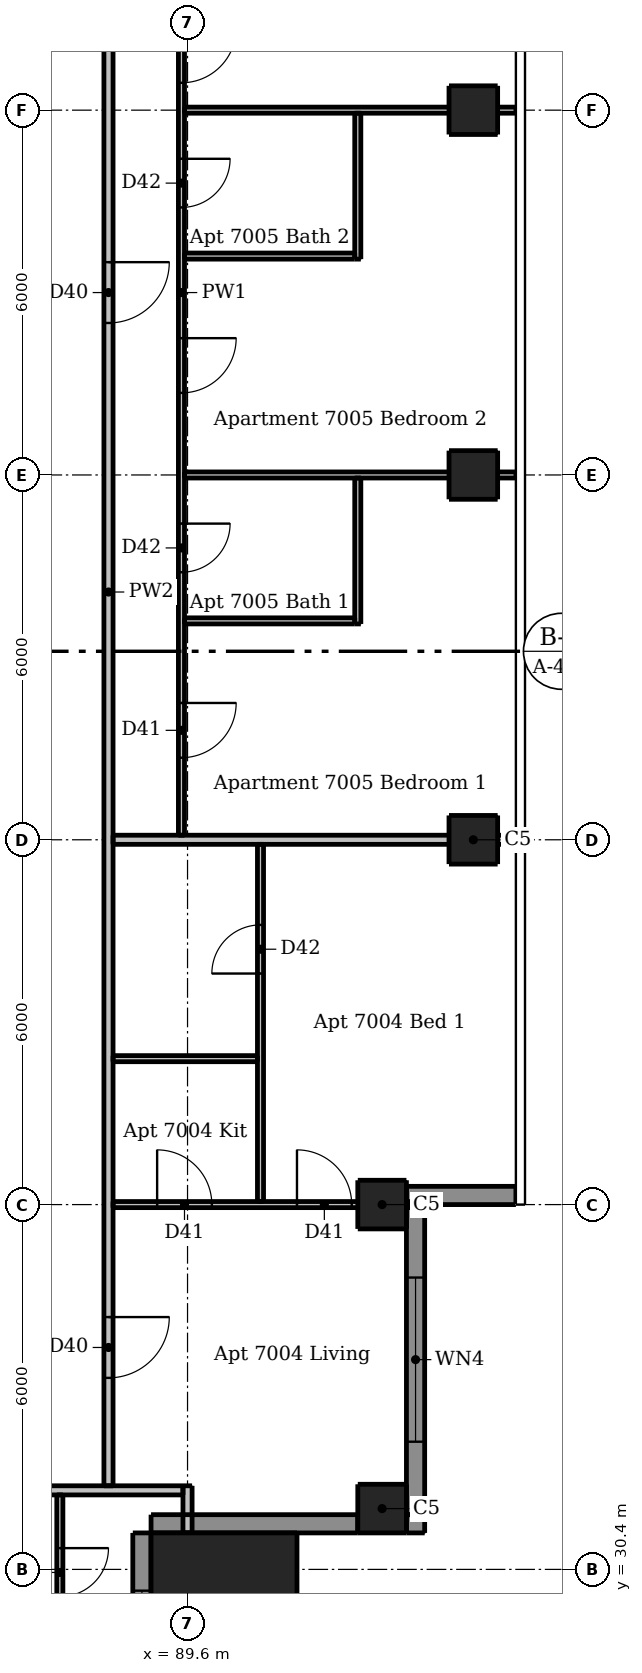
"""IFC4 building model, lengths in metres.
Left out: names, types, materials, properties, quantities, classifications, styles, units other than length and angle.
Written with IfcOpenShell. Run it as: python <this file> out.ifc"""

import sys

from ifc_helpers import new_model, si_unit, direction, frame, frame_2d, origin, origin_2d, place, context, subcontext, project, spatial, rectangle, extrude, element, fill, save


model = new_model("IFC4")
c1 = context("Model", 3, precision=1e-05, world=origin(), true_north=direction((0.0, 1.0)))
c2 = subcontext(c1, "Body", "Model", "MODEL_VIEW")
j1 = project(units=[si_unit("LENGTHUNIT", "METRE"), si_unit("PLANEANGLEUNIT", "RADIAN")], contexts=[c1])
p1 = place(None, origin())
s1 = spatial("IfcSite", under=j1, at=p1, CompositionType="ELEMENT")
p2 = place(p1, origin())
s2 = spatial("IfcBuilding", under=s1, at=p2, CompositionType="ELEMENT")
p3 = place(p2, frame((0.0, 0.0, 262.0)))
s3 = spatial("IfcBuildingStorey", under=s2, at=p3, CompositionType="ELEMENT", Elevation=262.0)
for number, where, z_axis, x_axis in (
    (1, (92.8, 31.4, 0.0), (0.0, 0.0, 1.0), (1.0, 0.0, 0.0)),
    (2, (92.8, 36.4, 0.0), (0.0, 0.0, 1.0), (1.0, 0.0, 0.0)),
    (3, (94.3, 42.4, 0.0), (0.0, 0.0, 1.0), (1.0, 0.0, 0.0)),
    (4, (94.3, 48.4, 0.0), (0.0, 0.0, 1.0), (1.0, 0.0, 0.0)),
    (5, (94.3, 54.4, 0.0), (0.0, 0.0, 1.0), (1.0, 0.0, 0.0)),
):
    element("IfcColumn", number, at=place(p3, frame(where, z_axis=z_axis, x_axis=x_axis)), inside=s3, PredefinedType="COLUMN", context=c2, shape_type="SweptSolid", body=[
        extrude(rectangle(XDim=0.8, YDim=0.8, at=origin_2d()), origin(), (0.0, 0.0, 1.0), 3.05),
    ])
p4 = place(p3, frame((90.2, 29.8, 0.0), z_axis=(0.0, 0.0, 1.0), x_axis=(1.0, 0.0, 0.0)))
e6 = element("IfcColumn", 6, at=p4, inside=s3, PredefinedType="COLUMN", context=c2, shape_type="SweptSolid", body=[
    extrude(rectangle(XDim=2.4, YDim=2.4, at=origin_2d()), origin(), (0.0, 0.0, 1.0), 3.3),
])
p5 = place(p3, frame((88.85, 27.6, 0.0), z_axis=(0.0, 0.0, 1.0), x_axis=(0.0, 1.0, 0.0)))
e7 = element("IfcWall", 7, at=p5, inside=s3, PredefinedType="SOLIDWALL", context=c2, shape_type="SweptSolid", body=[
    extrude(rectangle(XDim=3.4, YDim=0.3, at=frame_2d((1.7, 0.0))), origin(), (0.0, 0.0, 1.0), 3.05),
])
p6 = place(p5, frame((0.95, 0.0, 0.9)))
e8 = element("IfcOpeningElement", 8, at=p6, cuts=e7, PredefinedType="OPENING", context=c2, shape_type="SweptSolid", body=[
    extrude(rectangle(XDim=1.5, YDim=1.5, at=frame_2d((0.75, 0.75))), frame((0.0, 0.16, 0.0), z_axis=(0.0, -1.0, 0.0), x_axis=(1.0, 0.0, 0.0)), (0.0, 0.0, 1.0), 0.32),
])
p7 = place(p3, frame((89.0, 31.15, 0.0), z_axis=(0.0, 0.0, 1.0), x_axis=(1.0, 0.0, 0.0)))
e9 = element("IfcWall", 9, at=p7, inside=s3, PredefinedType="SOLIDWALL", context=c2, shape_type="SweptSolid", body=[
    extrude(rectangle(XDim=3.4, YDim=0.3, at=frame_2d((1.7, 0.0))), origin(), (0.0, 0.0, 1.0), 3.05),
])
p8 = place(p3, frame((93.2, 31.15, 0.0), z_axis=(0.0, 0.0, 1.0), x_axis=(1.0, 0.0, 0.0)))
e10 = element("IfcWall", 10, at=p8, inside=s3, PredefinedType="SOLIDWALL", context=c2, shape_type="SweptSolid", body=[
    extrude(rectangle(XDim=0.3, YDim=0.3, at=frame_2d((0.15, 0.0))), origin(), (0.0, 0.0, 1.0), 3.05),
])
p9 = place(p3, frame((93.2, 36.55, 0.0), z_axis=(0.0, 0.0, 1.0), x_axis=(1.0, 0.0, 0.0)))
e11 = element("IfcWall", 11, at=p9, inside=s3, PredefinedType="SOLIDWALL", context=c2, shape_type="SweptSolid", body=[
    extrude(rectangle(XDim=1.8, YDim=0.3, at=frame_2d((0.9, 0.0))), origin(), (0.0, 0.0, 1.0), 3.05),
])
p10 = place(p3, frame((93.35, 31.3, 0.0), z_axis=(0.0, 0.0, 1.0), x_axis=(0.0, 1.0, 0.0)))
e12 = element("IfcWall", 12, at=p10, inside=s3, PredefinedType="SOLIDWALL", context=c2, shape_type="SweptSolid", body=[
    extrude(rectangle(XDim=5.1, YDim=0.3, at=frame_2d((2.55, 0.0))), origin(), (0.0, 0.0, 1.0), 3.05),
])
p11 = place(p10, frame((1.2, 0.0, 0.15)))
e13 = element("IfcOpeningElement", 13, at=p11, cuts=e12, PredefinedType="OPENING", context=c2, shape_type="SweptSolid", body=[
    extrude(rectangle(XDim=2.7, YDim=2.1, at=frame_2d((1.35, 1.05))), frame((0.0, 0.16, 0.0), z_axis=(0.0, -1.0, 0.0), x_axis=(1.0, 0.0, 0.0)), (0.0, 0.0, 1.0), 0.32),
])
p12 = place(p3, frame((87.5, 31.625, 0.0), z_axis=(0.0, 0.0, 1.0), x_axis=(0.0, -1.0, 0.0)))
e14 = element("IfcWall", 14, at=p12, inside=s3, PredefinedType="PARTITIONING", context=c2, shape_type="SweptSolid", body=[
    extrude(rectangle(XDim=2.675, YDim=0.1, at=frame_2d((1.337, 0.0))), origin(), (0.0, 0.0, 1.0), 3.05),
])
p13 = place(p12, frame((0.875, 0.0, 0.0)))
e15 = element("IfcOpeningElement", 15, at=p13, cuts=e14, PredefinedType="OPENING", context=c2, shape_type="SweptSolid", body=[
    extrude(rectangle(XDim=0.8, YDim=2.1, at=frame_2d((0.4, 1.05))), frame((0.0, 0.06, 0.0), z_axis=(0.0, -1.0, 0.0), x_axis=(1.0, 0.0, 0.0)), (0.0, 0.0, 1.0), 0.12),
])
p14 = place(p3, frame((89.5, 60.325, 0.0), z_axis=(0.0, 0.0, 1.0), x_axis=(0.0, -1.0, 0.0)))
e16 = element("IfcWall", 16, at=p14, inside=s3, PredefinedType="PARTITIONING", context=c2, shape_type="SweptSolid", body=[
    extrude(rectangle(XDim=17.85, YDim=0.1, at=frame_2d((8.925, 0.0))), origin(), (0.0, 0.0, 1.0), 3.05),
])
p15 = place(p14, frame((4.575, 0.0, 0.0)))
e17 = element("IfcOpeningElement", 17, at=p15, cuts=e16, PredefinedType="OPENING", context=c2, shape_type="SweptSolid", body=[
    extrude(rectangle(XDim=0.9, YDim=2.1, at=frame_2d((0.45, 1.05))), frame((0.0, 0.06, 0.0), z_axis=(0.0, -1.0, 0.0), x_axis=(1.0, 0.0, 0.0)), (0.0, 0.0, 1.0), 0.12),
])
p16 = place(p14, frame((0.675, 0.0, 0.0)))
e18 = element("IfcOpeningElement", 18, at=p16, cuts=e16, PredefinedType="OPENING", context=c2, shape_type="SweptSolid", body=[
    extrude(rectangle(XDim=0.9, YDim=2.1, at=frame_2d((0.45, 1.05))), frame((0.0, 0.06, 0.0), z_axis=(0.0, -1.0, 0.0), x_axis=(1.0, 0.0, 0.0)), (0.0, 0.0, 1.0), 0.12),
])
p17 = place(p14, frame((2.775, 0.0, 0.0)))
e19 = element("IfcOpeningElement", 19, at=p17, cuts=e16, PredefinedType="OPENING", context=c2, shape_type="SweptSolid", body=[
    extrude(rectangle(XDim=0.9, YDim=2.1, at=frame_2d((0.45, 1.05))), frame((0.0, 0.06, 0.0), z_axis=(0.0, -1.0, 0.0), x_axis=(1.0, 0.0, 0.0)), (0.0, 0.0, 1.0), 0.12),
])
p18 = place(p14, frame((15.675, 0.0, 0.0)))
e20 = element("IfcOpeningElement", 20, at=p18, cuts=e16, PredefinedType="OPENING", context=c2, shape_type="SweptSolid", body=[
    extrude(rectangle(XDim=0.9, YDim=2.1, at=frame_2d((0.45, 1.05))), frame((0.0, 0.06, 0.0), z_axis=(0.0, -1.0, 0.0), x_axis=(1.0, 0.0, 0.0)), (0.0, 0.0, 1.0), 0.12),
])
p19 = place(p14, frame((9.675, 0.0, 0.0)))
e21 = element("IfcOpeningElement", 21, at=p19, cuts=e16, PredefinedType="OPENING", context=c2, shape_type="SweptSolid", body=[
    extrude(rectangle(XDim=0.9, YDim=2.1, at=frame_2d((0.45, 1.05))), frame((0.0, 0.06, 0.0), z_axis=(0.0, -1.0, 0.0), x_axis=(1.0, 0.0, 0.0)), (0.0, 0.0, 1.0), 0.12),
])
p20 = place(p14, frame((12.725, 0.0, 0.0)))
e22 = element("IfcOpeningElement", 22, at=p20, cuts=e16, PredefinedType="OPENING", context=c2, shape_type="SweptSolid", body=[
    extrude(rectangle(XDim=0.8, YDim=2.1, at=frame_2d((0.4, 1.05))), frame((0.0, 0.06, 0.0), z_axis=(0.0, -1.0, 0.0), x_axis=(1.0, 0.0, 0.0)), (0.0, 0.0, 1.0), 0.12),
])
p21 = place(p14, frame((6.725, 0.0, 0.0)))
e23 = element("IfcOpeningElement", 23, at=p21, cuts=e16, PredefinedType="OPENING", context=c2, shape_type="SweptSolid", body=[
    extrude(rectangle(XDim=0.8, YDim=2.1, at=frame_2d((0.4, 1.05))), frame((0.0, 0.06, 0.0), z_axis=(0.0, -1.0, 0.0), x_axis=(1.0, 0.0, 0.0)), (0.0, 0.0, 1.0), 0.12),
])
p22 = place(p3, frame((90.8, 36.45, 0.0), z_axis=(0.0, 0.0, 1.0), x_axis=(0.0, 1.0, 0.0)))
e24 = element("IfcWall", 24, at=p22, inside=s3, PredefinedType="PARTITIONING", context=c2, shape_type="SweptSolid", body=[
    extrude(rectangle(XDim=5.875, YDim=0.1, at=frame_2d((2.938, 0.0))), origin(), (0.0, 0.0, 1.0), 3.05),
])
p23 = place(p22, frame((3.75, 0.0, 0.0)))
e25 = element("IfcOpeningElement", 25, at=p23, cuts=e24, PredefinedType="OPENING", context=c2, shape_type="SweptSolid", body=[
    extrude(rectangle(XDim=0.8, YDim=2.1, at=frame_2d((0.4, 1.05))), frame((0.0, 0.06, 0.0), z_axis=(0.0, -1.0, 0.0), x_axis=(1.0, 0.0, 0.0)), (0.0, 0.0, 1.0), 0.12),
])
for number, where, z_axis, x_axis in (
    (26, (92.4, 45.95, 0.0), (0.0, 0.0, 1.0), (0.0, 1.0, 0.0)),
    (27, (92.4, 51.95, 0.0), (0.0, 0.0, 1.0), (0.0, 1.0, 0.0)),
):
    element("IfcWall", number, at=place(p3, frame(where, z_axis=z_axis, x_axis=x_axis)), inside=s3, PredefinedType="PARTITIONING", context=c2, shape_type="SweptSolid", body=[
        extrude(rectangle(XDim=2.4, YDim=0.1, at=frame_2d((1.2, 0.0))), origin(), (0.0, 0.0, 1.0), 3.05),
    ])
p24 = place(p3, frame((89.55, 54.4, 0.0), z_axis=(0.0, 0.0, 1.0), x_axis=(1.0, 0.0, 0.0)))
e28 = element("IfcWall", 28, at=p24, inside=s3, PredefinedType="PARTITIONING", context=c2, shape_type="SweptSolid", body=[
    extrude(rectangle(XDim=5.45, YDim=0.1, at=frame_2d((2.725, 0.0))), origin(), (0.0, 0.0, 1.0), 2.59),
])
p25 = place(p3, frame((89.55, 52.0, 0.0), z_axis=(0.0, 0.0, 1.0), x_axis=(1.0, 0.0, 0.0)))
e29 = element("IfcWall", 29, at=p25, inside=s3, PredefinedType="PARTITIONING", context=c2, shape_type="SweptSolid", body=[
    extrude(rectangle(XDim=2.8, YDim=0.1, at=frame_2d((1.4, 0.0))), origin(), (0.0, 0.0, 1.0), 3.05),
])
p26 = place(p3, frame((89.55, 48.4, 0.0), z_axis=(0.0, 0.0, 1.0), x_axis=(1.0, 0.0, 0.0)))
e30 = element("IfcWall", 30, at=p26, inside=s3, PredefinedType="PARTITIONING", context=c2, shape_type="SweptSolid", body=[
    extrude(rectangle(XDim=5.45, YDim=0.1, at=frame_2d((2.725, 0.0))), origin(), (0.0, 0.0, 1.0), 2.59),
])
p27 = place(p3, frame((89.55, 46.0, 0.0), z_axis=(0.0, 0.0, 1.0), x_axis=(1.0, 0.0, 0.0)))
e31 = element("IfcWall", 31, at=p27, inside=s3, PredefinedType="PARTITIONING", context=c2, shape_type="SweptSolid", body=[
    extrude(rectangle(XDim=2.8, YDim=0.1, at=frame_2d((1.4, 0.0))), origin(), (0.0, 0.0, 1.0), 3.05),
])
p28 = place(p3, frame((88.375, 38.8, 0.0), z_axis=(0.0, 0.0, 1.0), x_axis=(1.0, 0.0, 0.0)))
e32 = element("IfcWall", 32, at=p28, inside=s3, PredefinedType="PARTITIONING", context=c2, shape_type="SweptSolid", body=[
    extrude(rectangle(XDim=2.375, YDim=0.1, at=frame_2d((1.188, 0.0))), origin(), (0.0, 0.0, 1.0), 3.05),
])
p29 = place(p3, frame((88.375, 36.4, 0.0), z_axis=(0.0, 0.0, 1.0), x_axis=(1.0, 0.0, 0.0)))
e33 = element("IfcWall", 33, at=p29, inside=s3, PredefinedType="PARTITIONING", context=c2, shape_type="SweptSolid", body=[
    extrude(rectangle(XDim=5.125, YDim=0.1, at=frame_2d((2.562, 0.0))), origin(), (0.0, 0.0, 1.0), 2.647),
])
p30 = place(p29, frame((0.725, 0.0, 0.0)))
e34 = element("IfcOpeningElement", 34, at=p30, cuts=e33, PredefinedType="OPENING", context=c2, shape_type="SweptSolid", body=[
    extrude(rectangle(XDim=0.9, YDim=2.1, at=frame_2d((0.45, 1.05))), frame((0.0, 0.06, 0.0), z_axis=(0.0, -1.0, 0.0), x_axis=(1.0, 0.0, 0.0)), (0.0, 0.0, 1.0), 0.12),
])
p31 = place(p29, frame((3.025, 0.0, 0.0)))
e35 = element("IfcOpeningElement", 35, at=p31, cuts=e33, PredefinedType="OPENING", context=c2, shape_type="SweptSolid", body=[
    extrude(rectangle(XDim=0.9, YDim=2.1, at=frame_2d((0.45, 1.05))), frame((0.0, 0.06, 0.0), z_axis=(0.0, -1.0, 0.0), x_axis=(1.0, 0.0, 0.0)), (0.0, 0.0, 1.0), 0.12),
])
p32 = place(p3, frame((88.3, 61.175, 0.0), z_axis=(0.0, 0.0, 1.0), x_axis=(0.0, -1.0, 0.0)))
e36 = element("IfcWall", 36, at=p32, inside=s3, PredefinedType="PARTITIONING", context=c2, shape_type="SweptSolid", body=[
    extrude(rectangle(XDim=29.4, YDim=0.15, at=frame_2d((14.7, 0.0))), origin(), (0.0, 0.0, 1.0), 3.05),
])
p33 = place(p32, frame((26.625, 0.0, 0.0)))
e37 = element("IfcOpeningElement", 37, at=p33, cuts=e36, PredefinedType="OPENING", context=c2, shape_type="SweptSolid", body=[
    extrude(rectangle(XDim=1.0, YDim=2.1, at=frame_2d((0.5, 1.05))), frame((0.0, 0.085, 0.0), z_axis=(0.0, -1.0, 0.0), x_axis=(1.0, 0.0, 0.0)), (0.0, 0.0, 1.0), 0.17),
])
p34 = place(p32, frame((9.275, 0.0, 0.0)))
e38 = element("IfcOpeningElement", 38, at=p34, cuts=e36, PredefinedType="OPENING", context=c2, shape_type="SweptSolid", body=[
    extrude(rectangle(XDim=1.0, YDim=2.1, at=frame_2d((0.5, 1.05))), frame((0.0, 0.085, 0.0), z_axis=(0.0, -1.0, 0.0), x_axis=(1.0, 0.0, 0.0)), (0.0, 0.0, 1.0), 0.17),
])
p35 = place(p3, frame((89.6, 31.0, 0.0), z_axis=(0.0, 0.0, 1.0), x_axis=(0.0, 1.0, 0.0)))
e39 = element("IfcWall", 39, at=p35, inside=s3, PredefinedType="PARTITIONING", context=c2, shape_type="SweptSolid", body=[
    extrude(rectangle(XDim=0.775, YDim=0.15, at=frame_2d((0.387, 0.0))), origin(), (0.0, 0.0, 1.0), 3.05),
])
p36 = place(p3, frame((88.375, 42.4, 0.0), z_axis=(0.0, 0.0, 1.0), x_axis=(1.0, 0.0, 0.0)))
e40 = element("IfcWall", 40, at=p36, inside=s3, PredefinedType="PARTITIONING", context=c2, shape_type="SweptSolid", body=[
    extrude(rectangle(XDim=6.625, YDim=0.15, at=frame_2d((3.312, 0.0))), origin(), (0.0, 0.0, 1.0), 2.59),
])
p37 = place(p3, frame((89.525, 31.7, 0.0), z_axis=(0.0, 0.0, 1.0), x_axis=(-1.0, 0.0, 0.0)))
e41 = element("IfcWall", 41, at=p37, inside=s3, PredefinedType="PARTITIONING", context=c2, shape_type="SweptSolid", body=[
    extrude(rectangle(XDim=30.55, YDim=0.15, at=frame_2d((15.275, 0.0))), origin(), (0.0, 0.0, 1.0), 3.05),
])
p38 = place(p37, frame((26.775, 0.0, 0.0)))
e42 = element("IfcOpeningElement", 42, at=p38, cuts=e41, PredefinedType="OPENING", context=c2, shape_type="SweptSolid", body=[
    extrude(rectangle(XDim=1.0, YDim=2.1, at=frame_2d((0.5, 1.05))), frame((0.0, 0.085, 0.0), z_axis=(0.0, -1.0, 0.0), x_axis=(1.0, 0.0, 0.0)), (0.0, 0.0, 1.0), 0.17),
])
p39 = place(p37, frame((9.625, 0.0, 0.0)))
e43 = element("IfcOpeningElement", 43, at=p39, cuts=e41, PredefinedType="OPENING", context=c2, shape_type="SweptSolid", body=[
    extrude(rectangle(XDim=1.0, YDim=2.1, at=frame_2d((0.5, 1.05))), frame((0.0, 0.085, 0.0), z_axis=(0.0, -1.0, 0.0), x_axis=(1.0, 0.0, 0.0)), (0.0, 0.0, 1.0), 0.17),
])
p40 = place(p37, frame((2.425, 0.0, 0.0)))
e44 = element("IfcOpeningElement", 44, at=p40, cuts=e41, PredefinedType="OPENING", context=c2, shape_type="SweptSolid", body=[
    extrude(rectangle(XDim=1.0, YDim=2.1, at=frame_2d((0.5, 1.05))), frame((0.0, 0.085, 0.0), z_axis=(0.0, -1.0, 0.0), x_axis=(1.0, 0.0, 0.0)), (0.0, 0.0, 1.0), 0.17),
])
p41 = place(p6, origin())
e45 = element("IfcWindow", 45, at=p41, inside=s3, PartitioningType="DOUBLE_PANEL_VERTICAL", PredefinedType="WINDOW", context=c2, shape_type="SweptSolid", body=[
    extrude(rectangle(XDim=1.5, YDim=1.5, at=frame_2d((0.75, 0.75))), frame((0.0, 0.03, 0.0), z_axis=(0.0, -1.0, 0.0), x_axis=(1.0, 0.0, 0.0)), (0.0, 0.0, 1.0), 0.06),
])
fill(e8, e45)
p42 = place(p11, origin())
e46 = element("IfcWindow", 46, at=p42, inside=s3, PartitioningType="DOUBLE_PANEL_VERTICAL", PredefinedType="WINDOW", context=c2, shape_type="SweptSolid", body=[
    extrude(rectangle(XDim=2.7, YDim=2.1, at=frame_2d((1.35, 1.05))), frame((0.0, 0.03, 0.0), z_axis=(0.0, -1.0, 0.0), x_axis=(1.0, 0.0, 0.0)), (0.0, 0.0, 1.0), 0.06),
])
fill(e13, e46)
p43 = place(p13, origin())
e47 = element("IfcDoor", 47, at=p43, inside=s3, OperationType="SINGLE_SWING_LEFT", PredefinedType="DOOR", context=c2, shape_type="SweptSolid", body=[
    extrude(rectangle(XDim=0.8, YDim=2.1, at=frame_2d((0.4, 1.05))), frame((0.0, 0.025, 0.0), z_axis=(0.0, -1.0, 0.0), x_axis=(1.0, 0.0, 0.0)), (0.0, 0.0, 1.0), 0.05),
])
fill(e15, e47)
p44 = place(p33, origin())
e48 = element("IfcDoor", 48, at=p44, inside=s3, OperationType="SINGLE_SWING_LEFT", PredefinedType="DOOR", context=c2, shape_type="SweptSolid", body=[
    extrude(rectangle(XDim=1.0, YDim=2.1, at=frame_2d((0.5, 1.05))), frame((0.0, 0.025, 0.0), z_axis=(0.0, -1.0, 0.0), x_axis=(1.0, 0.0, 0.0)), (0.0, 0.0, 1.0), 0.05),
])
fill(e37, e48)
p45 = place(p30, origin())
e49 = element("IfcDoor", 49, at=p45, inside=s3, OperationType="SINGLE_SWING_LEFT", PredefinedType="DOOR", context=c2, shape_type="SweptSolid", body=[
    extrude(rectangle(XDim=0.9, YDim=2.1, at=frame_2d((0.45, 1.05))), frame((0.0, 0.025, 0.0), z_axis=(0.0, -1.0, 0.0), x_axis=(1.0, 0.0, 0.0)), (0.0, 0.0, 1.0), 0.05),
])
fill(e34, e49)
p46 = place(p31, origin())
e50 = element("IfcDoor", 50, at=p46, inside=s3, OperationType="SINGLE_SWING_LEFT", PredefinedType="DOOR", context=c2, shape_type="SweptSolid", body=[
    extrude(rectangle(XDim=0.9, YDim=2.1, at=frame_2d((0.45, 1.05))), frame((0.0, 0.025, 0.0), z_axis=(0.0, -1.0, 0.0), x_axis=(1.0, 0.0, 0.0)), (0.0, 0.0, 1.0), 0.05),
])
fill(e35, e50)
p47 = place(p23, origin())
e51 = element("IfcDoor", 51, at=p47, inside=s3, OperationType="SINGLE_SWING_LEFT", PredefinedType="DOOR", context=c2, shape_type="SweptSolid", body=[
    extrude(rectangle(XDim=0.8, YDim=2.1, at=frame_2d((0.4, 1.05))), frame((0.0, 0.025, 0.0), z_axis=(0.0, -1.0, 0.0), x_axis=(1.0, 0.0, 0.0)), (0.0, 0.0, 1.0), 0.05),
])
fill(e25, e51)
p48 = place(p34, origin())
e52 = element("IfcDoor", 52, at=p48, inside=s3, OperationType="SINGLE_SWING_LEFT", PredefinedType="DOOR", context=c2, shape_type="SweptSolid", body=[
    extrude(rectangle(XDim=1.0, YDim=2.1, at=frame_2d((0.5, 1.05))), frame((0.0, 0.025, 0.0), z_axis=(0.0, -1.0, 0.0), x_axis=(1.0, 0.0, 0.0)), (0.0, 0.0, 1.0), 0.05),
])
fill(e38, e52)
p49 = place(p15, origin())
e53 = element("IfcDoor", 53, at=p49, inside=s3, OperationType="SINGLE_SWING_LEFT", PredefinedType="DOOR", context=c2, shape_type="SweptSolid", body=[
    extrude(rectangle(XDim=0.9, YDim=2.1, at=frame_2d((0.45, 1.05))), frame((0.0, 0.025, 0.0), z_axis=(0.0, -1.0, 0.0), x_axis=(1.0, 0.0, 0.0)), (0.0, 0.0, 1.0), 0.05),
])
fill(e17, e53)
p50 = place(p18, origin())
e54 = element("IfcDoor", 54, at=p50, inside=s3, OperationType="SINGLE_SWING_LEFT", PredefinedType="DOOR", context=c2, shape_type="SweptSolid", body=[
    extrude(rectangle(XDim=0.9, YDim=2.1, at=frame_2d((0.45, 1.05))), frame((0.0, 0.025, 0.0), z_axis=(0.0, -1.0, 0.0), x_axis=(1.0, 0.0, 0.0)), (0.0, 0.0, 1.0), 0.05),
])
fill(e20, e54)
p51 = place(p19, origin())
e55 = element("IfcDoor", 55, at=p51, inside=s3, OperationType="SINGLE_SWING_LEFT", PredefinedType="DOOR", context=c2, shape_type="SweptSolid", body=[
    extrude(rectangle(XDim=0.9, YDim=2.1, at=frame_2d((0.45, 1.05))), frame((0.0, 0.025, 0.0), z_axis=(0.0, -1.0, 0.0), x_axis=(1.0, 0.0, 0.0)), (0.0, 0.0, 1.0), 0.05),
])
fill(e21, e55)
p52 = place(p20, origin())
e56 = element("IfcDoor", 56, at=p52, inside=s3, OperationType="SINGLE_SWING_LEFT", PredefinedType="DOOR", context=c2, shape_type="SweptSolid", body=[
    extrude(rectangle(XDim=0.8, YDim=2.1, at=frame_2d((0.4, 1.05))), frame((0.0, 0.025, 0.0), z_axis=(0.0, -1.0, 0.0), x_axis=(1.0, 0.0, 0.0)), (0.0, 0.0, 1.0), 0.05),
])
fill(e22, e56)
p53 = place(p21, origin())
e57 = element("IfcDoor", 57, at=p53, inside=s3, OperationType="SINGLE_SWING_LEFT", PredefinedType="DOOR", context=c2, shape_type="SweptSolid", body=[
    extrude(rectangle(XDim=0.8, YDim=2.1, at=frame_2d((0.4, 1.05))), frame((0.0, 0.025, 0.0), z_axis=(0.0, -1.0, 0.0), x_axis=(1.0, 0.0, 0.0)), (0.0, 0.0, 1.0), 0.05),
])
fill(e23, e57)
save(model, sys.argv[1])
